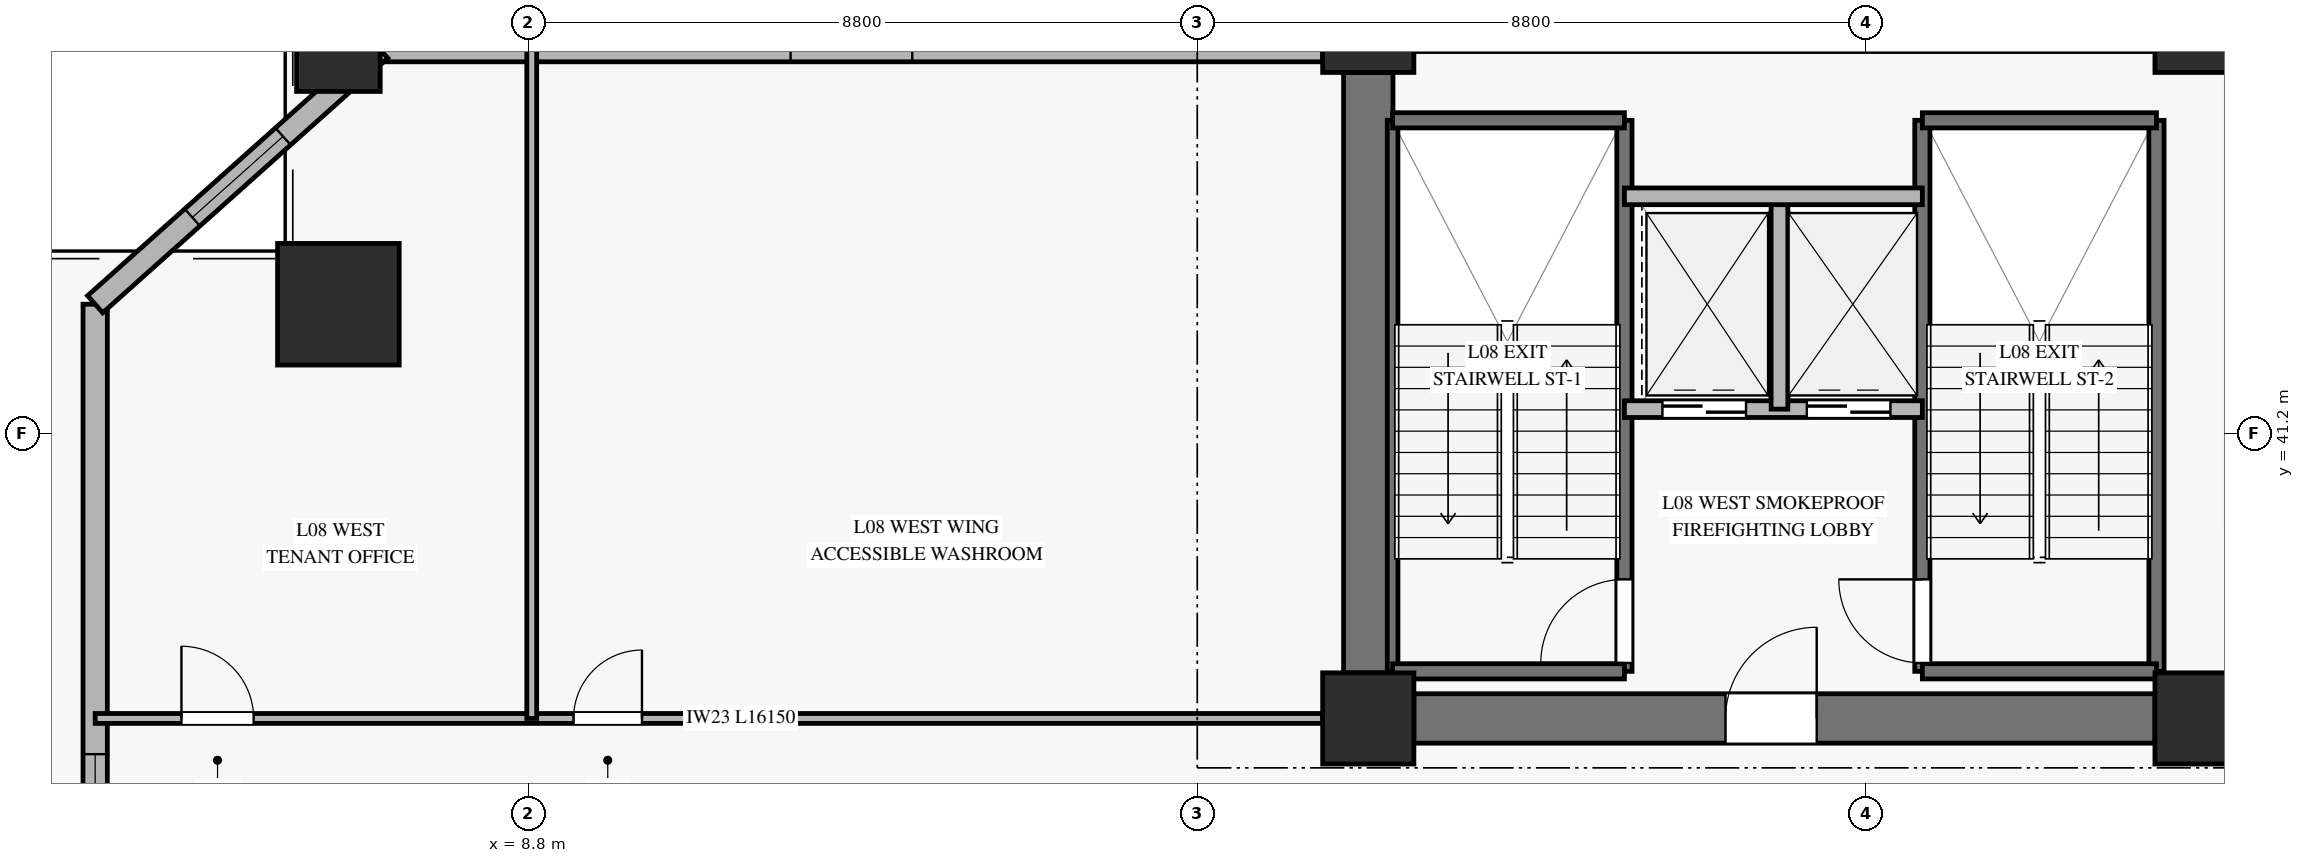
"""IFC4 building model, lengths in metres.
Left out: names, types, materials, properties, quantities, classifications, styles, units other than length and angle.
Written with IfcOpenShell. Run it as: python <this file> out.ifc"""

import sys

from ifc_helpers import new_model, si_unit, direction, frame, frame_2d, origin, origin_2d, place, context, subcontext, project, spatial, rectangle, hollow_rectangle, extrude, source, transform, mapped, element, fill, save


model = new_model("IFC4")
c1 = context("Model", 3, precision=1e-05, world=origin(), true_north=direction((0.0, 1.0)))
c2 = subcontext(c1, "Body", "Model", "MODEL_VIEW")
j1 = project(units=[si_unit("LENGTHUNIT", "METRE"), si_unit("PLANEANGLEUNIT", "RADIAN")], contexts=[c1])
p1 = place(None, origin())
s1 = spatial("IfcSite", under=j1, at=p1, CompositionType="ELEMENT")
p2 = place(p1, origin())
s2 = spatial("IfcBuilding", under=s1, at=p2, CompositionType="ELEMENT")
p3 = place(p2, frame((0.0, 0.0, 33.2)))
s3 = spatial("IfcBuildingStorey", under=s2, at=p3, CompositionType="ELEMENT", Elevation=33.2)
m1 = source(origin(), c2, "Body", "SweptSolid", [
    extrude(rectangle(XDim=1.2, YDim=1.2, at=origin_2d()), origin(), (0.0, 0.0, 1.0), 3.68),
])
for number, where, z_axis, x_axis in (
    (1, (19.85, 37.45, 0.0), (0.0, 0.0, 1.0), (1.0, 0.0, 0.0)),
    (2, (19.85, 46.55, 0.0), (0.0, 0.0, 1.0), (1.0, 0.0, 0.0)),
    (3, (30.8, 37.45, 0.0), (0.0, 0.0, 1.0), (1.0, 0.0, 0.0)),
    (4, (30.8, 46.55, 0.0), (0.0, 0.0, 1.0), (1.0, 0.0, 0.0)),
):
    element("IfcColumn", number, at=place(p3, frame(where, z_axis=z_axis, x_axis=x_axis)), inside=s3, PredefinedType="PILASTER", context=c2, shape_type="MappedRepresentation", body=[
        mapped(m1, transform((0.0, 0.0, 0.0), x_axis=(1.0, 0.0, 0.0), y_axis=(0.0, 1.0, 0.0), z_axis=(0.0, 0.0, 1.0), scale=1.0)),
    ])
p4 = place(p3, frame((20.45, 37.45, 0.0), z_axis=(0.0, 0.0, 1.0), x_axis=(1.0, 0.0, 0.0)))
e5 = element("IfcWall", 5, at=p4, inside=s3, PredefinedType="SHEAR", context=c2, shape_type="SweptSolid", body=[
    extrude(rectangle(XDim=9.75, YDim=0.65, at=frame_2d((4.875, 0.0))), origin(), (0.0, 0.0, 1.0), 3.68),
])
p5 = place(p4, frame((4.1, 0.0, 0.0)))
e6 = element("IfcOpeningElement", 6, at=p5, cuts=e5, PredefinedType="OPENING", context=c2, shape_type="SweptSolid", body=[
    extrude(rectangle(XDim=1.2, YDim=2.15, at=frame_2d((0.6, 1.075))), frame((0.0, 0.335, 0.0), z_axis=(0.0, -1.0, 0.0), x_axis=(1.0, 0.0, 0.0)), (0.0, 0.0, 1.0), 0.67),
])
p6 = place(p3, frame((19.85, 38.05, 0.0), z_axis=(0.0, 0.0, 1.0), x_axis=(0.0, 1.0, 0.0)))
e7 = element("IfcWall", 7, at=p6, inside=s3, PredefinedType="SHEAR", context=c2, shape_type="SweptSolid", body=[
    extrude(rectangle(XDim=7.9, YDim=0.65, at=frame_2d((3.95, 0.0))), origin(), (0.0, 0.0, 1.0), 3.68),
])
m2 = source(origin(), c2, "Body", "SweptSolid", [
    extrude(hollow_rectangle(XDim=1.6, YDim=1.6, WallThickness=0.075, at=origin_2d()), origin(), (0.0, 0.0, 1.0), 3.686),
])
p7 = place(p3, frame((6.3, 42.9, 0.0), z_axis=(0.056697506007, 0.007087188251, 0.998366247714), x_axis=(-0.124034734589, 0.992277876714, 0.0)))
e8 = element("IfcColumn", 8, at=p7, inside=s3, PredefinedType="COLUMN", context=c2, shape_type="MappedRepresentation", body=[
    mapped(m2, transform((0.0, 0.0, 0.0), x_axis=(1.0, 0.0, 0.0), y_axis=(0.0, 1.0, 0.0), z_axis=(0.0, 0.0, 1.0), scale=1.0)),
])
m3 = source(origin(), c2, "Body", "SweptSolid", [
    extrude(hollow_rectangle(XDim=1.1, YDim=1.1, WallThickness=0.05, at=origin_2d()), origin(), (0.0, 0.0, 1.0), 3.686),
])
p8 = place(p3, frame((6.3, 46.25, 0.0), z_axis=(0.056698929969, 0.0, 0.998391321747), x_axis=(0.0, 1.0, 0.0)))
e9 = element("IfcColumn", 9, at=p8, inside=s3, PredefinedType="COLUMN", context=c2, shape_type="MappedRepresentation", body=[
    mapped(m3, transform((0.0, 0.0, 0.0), x_axis=(1.0, 0.0, 0.0), y_axis=(0.0, 1.0, 0.0), z_axis=(0.0, 0.0, 1.0), scale=1.0)),
])
p9 = place(p3, frame((3.1, 25.25, 0.0), z_axis=(0.0, 0.0, 1.0), x_axis=(0.0, 1.0, 0.0)))
e10 = element("IfcWall", 10, at=p9, inside=s3, PredefinedType="SOLIDWALL", context=c2, shape_type="SweptSolid", body=[
    extrude(rectangle(XDim=17.65, YDim=0.32, at=frame_2d((8.825, 0.0))), origin(), (0.0, 0.0, 1.0), 3.16),
])
p10 = place(p9, frame((10.13, 0.0, 0.45)))
e11 = element("IfcOpeningElement", 11, at=p10, cuts=e10, PredefinedType="OPENING", context=c2, shape_type="SweptSolid", body=[
    extrude(rectangle(XDim=1.6, YDim=2.0, at=frame_2d((0.8, 1.0))), frame((0.0, 0.17, 0.0), z_axis=(0.0, -1.0, 0.0), x_axis=(1.0, 0.0, 0.0)), (0.0, 0.0, 1.0), 0.34),
])
p11 = place(p3, frame((6.85, 46.25, 0.0), z_axis=(0.0, 0.0, 1.0), x_axis=(1.0, 0.0, 0.0)))
e12 = element("IfcWall", 12, at=p11, inside=s3, PredefinedType="SOLIDWALL", context=c2, shape_type="SweptSolid", body=[
    extrude(rectangle(XDim=12.4, YDim=0.32, at=frame_2d((6.2, 0.0))), origin(), (0.0, 0.0, 1.0), 3.16),
])
p12 = place(p11, frame((5.4, 0.0, 0.45)))
e13 = element("IfcOpeningElement", 13, at=p12, cuts=e12, PredefinedType="OPENING", context=c2, shape_type="SweptSolid", body=[
    extrude(rectangle(XDim=1.6, YDim=2.0, at=frame_2d((0.8, 1.0))), frame((0.0, 0.17, 0.0), z_axis=(0.0, -1.0, 0.0), x_axis=(1.0, 0.0, 0.0)), (0.0, 0.0, 1.0), 0.34),
])
p13 = place(p3, frame((6.85, 46.25, 0.0), z_axis=(0.0, 0.0, 1.0), x_axis=(-0.745751558502, -0.666224146209, 0.0)))
e14 = element("IfcWall", 14, at=p13, inside=s3, PredefinedType="SOLIDWALL", context=c2, shape_type="SweptSolid", body=[
    extrude(rectangle(XDim=5.029, YDim=0.3, at=frame_2d((2.514, 0.0))), origin(), (0.0, 0.0, 1.0), 3.16),
])
p14 = place(p13, frame((1.714, 0.0, 0.45)))
e15 = element("IfcOpeningElement", 15, at=p14, cuts=e14, PredefinedType="OPENING", context=c2, shape_type="SweptSolid", body=[
    extrude(rectangle(XDim=1.6, YDim=2.0, at=frame_2d((0.8, 1.0))), frame((0.0, 0.16, 0.0), z_axis=(0.0, -1.0, 0.0), x_axis=(1.0, 0.0, 0.0)), (0.0, 0.0, 1.0), 0.32),
])
p15 = place(p3, frame((20.17, 38.07, 0.0), z_axis=(0.0, 0.0, 1.0), x_axis=(0.0, 1.0, 0.0)))
e16 = element("IfcWall", 16, at=p15, inside=s3, PredefinedType="SOLIDWALL", context=c2, shape_type="SweptSolid", body=[
    extrude(rectangle(XDim=7.25, YDim=0.14, at=frame_2d((3.625, 0.0))), origin(), (0.0, 0.0, 1.0), 3.9),
])
p16 = place(p3, frame((23.22, 38.07, 0.0), z_axis=(0.0, 0.0, 1.0), x_axis=(0.0, 1.0, 0.0)))
e17 = element("IfcWall", 17, at=p16, inside=s3, PredefinedType="SOLIDWALL", context=c2, shape_type="SweptSolid", body=[
    extrude(rectangle(XDim=7.25, YDim=0.2, at=frame_2d((3.625, 0.0))), origin(), (0.0, 0.0, 1.0), 3.9),
])
p17 = place(p16, frame((0.11, 0.0, 0.0)))
e18 = element("IfcOpeningElement", 18, at=p17, cuts=e17, PredefinedType="OPENING", context=c2, shape_type="SweptSolid", body=[
    extrude(rectangle(XDim=1.1, YDim=2.15, at=frame_2d((0.55, 1.075))), frame((0.0, 0.11, 0.0), z_axis=(0.0, -1.0, 0.0), x_axis=(1.0, 0.0, 0.0)), (0.0, 0.0, 1.0), 0.22),
])
for number, where, z_axis, x_axis in (
    (19, (20.17, 45.32, 0.0), (0.0, 0.0, 1.0), (1.0, 0.0, 0.0)),
    (20, (20.17, 38.07, 0.0), (0.0, 0.0, 1.0), (1.0, 0.0, 0.0)),
):
    element("IfcWall", number, at=place(p3, frame(where, z_axis=z_axis, x_axis=x_axis)), inside=s3, PredefinedType="SOLIDWALL", context=c2, shape_type="SweptSolid", body=[
        extrude(rectangle(XDim=3.05, YDim=0.2, at=frame_2d((1.525, 0.0))), origin(), (0.0, 0.0, 1.0), 3.9),
    ])
p18 = place(p3, frame((27.14, 38.07, 0.0), z_axis=(0.0, 0.0, 1.0), x_axis=(0.0, 1.0, 0.0)))
e21 = element("IfcWall", 21, at=p18, inside=s3, PredefinedType="SOLIDWALL", context=c2, shape_type="SweptSolid", body=[
    extrude(rectangle(XDim=7.25, YDim=0.2, at=frame_2d((3.625, 0.0))), origin(), (0.0, 0.0, 1.0), 3.9),
])
p19 = place(p18, frame((0.11, 0.0, 0.0)))
e22 = element("IfcOpeningElement", 22, at=p19, cuts=e21, PredefinedType="OPENING", context=c2, shape_type="SweptSolid", body=[
    extrude(rectangle(XDim=1.1, YDim=2.15, at=frame_2d((0.55, 1.075))), frame((0.0, 0.11, 0.0), z_axis=(0.0, -1.0, 0.0), x_axis=(1.0, 0.0, 0.0)), (0.0, 0.0, 1.0), 0.22),
])
p20 = place(p3, frame((30.22, 38.07, 0.0), z_axis=(0.0, 0.0, 1.0), x_axis=(0.0, 1.0, 0.0)))
e23 = element("IfcWall", 23, at=p20, inside=s3, PredefinedType="SOLIDWALL", context=c2, shape_type="SweptSolid", body=[
    extrude(rectangle(XDim=7.25, YDim=0.2, at=frame_2d((3.625, 0.0))), origin(), (0.0, 0.0, 1.0), 3.9),
])
for number, where, z_axis, x_axis in (
    (24, (27.14, 45.32, 0.0), (0.0, 0.0, 1.0), (1.0, 0.0, 0.0)),
    (25, (27.14, 38.07, 0.0), (0.0, 0.0, 1.0), (1.0, 0.0, 0.0)),
):
    element("IfcWall", number, at=place(p3, frame(where, z_axis=z_axis, x_axis=x_axis)), inside=s3, PredefinedType="SOLIDWALL", context=c2, shape_type="SweptSolid", body=[
        extrude(rectangle(XDim=3.08, YDim=0.2, at=frame_2d((1.54, 0.0))), origin(), (0.0, 0.0, 1.0), 3.9),
    ])
p21 = place(p3, frame((23.22, 41.52, 0.0), z_axis=(0.0, 0.0, 1.0), x_axis=(1.0, 0.0, 0.0)))
e26 = element("IfcWall", 26, at=p21, inside=s3, PredefinedType="SOLIDWALL", context=c2, shape_type="SweptSolid", body=[
    extrude(rectangle(XDim=3.92, YDim=0.22, at=frame_2d((1.96, 0.0))), origin(), (0.0, 0.0, 1.0), 3.68),
])
p22 = place(p21, frame((0.5, 0.0, 0.0)))
e27 = element("IfcOpeningElement", 27, at=p22, cuts=e26, PredefinedType="OPENING", context=c2, shape_type="SweptSolid", body=[
    extrude(rectangle(XDim=1.1, YDim=2.2, at=frame_2d((0.55, 1.1))), frame((0.0, 0.12, 0.0), z_axis=(0.0, -1.0, 0.0), x_axis=(1.0, 0.0, 0.0)), (0.0, 0.0, 1.0), 0.24),
])
p23 = place(p21, frame((2.4, 0.0, 0.0)))
e28 = element("IfcOpeningElement", 28, at=p23, cuts=e26, PredefinedType="OPENING", context=c2, shape_type="SweptSolid", body=[
    extrude(rectangle(XDim=1.1, YDim=2.2, at=frame_2d((0.55, 1.1))), frame((0.0, 0.12, 0.0), z_axis=(0.0, -1.0, 0.0), x_axis=(1.0, 0.0, 0.0)), (0.0, 0.0, 1.0), 0.24),
])
p24 = place(p3, frame((25.26, 41.52, 0.0), z_axis=(0.0, 0.0, 1.0), x_axis=(0.0, 1.0, 0.0)))
e29 = element("IfcWall", 29, at=p24, inside=s3, PredefinedType="SOLIDWALL", context=c2, shape_type="SweptSolid", body=[
    extrude(rectangle(XDim=2.8, YDim=0.22, at=frame_2d((1.4, 0.0))), origin(), (0.0, 0.0, 1.0), 3.68),
])
p25 = place(p3, frame((23.22, 44.32, 0.0), z_axis=(0.0, 0.0, 1.0), x_axis=(1.0, 0.0, 0.0)))
e30 = element("IfcWall", 30, at=p25, inside=s3, PredefinedType="SOLIDWALL", context=c2, shape_type="SweptSolid", body=[
    extrude(rectangle(XDim=3.92, YDim=0.22, at=frame_2d((1.96, 0.0))), origin(), (0.0, 0.0, 1.0), 3.68),
])
p26 = place(p3, frame((3.1, 37.45, 0.0), z_axis=(0.0, 0.0, 1.0), x_axis=(1.0, 0.0, 0.0)))
e31 = element("IfcWall", 31, at=p26, inside=s3, PredefinedType="PARTITIONING", context=c2, shape_type="SweptSolid", body=[
    extrude(rectangle(XDim=16.15, YDim=0.13, at=frame_2d((8.075, 0.0))), origin(), (0.0, 0.0, 1.0), 3.165),
])
p27 = place(p26, frame((1.135, 0.0, 0.0)))
e32 = element("IfcOpeningElement", 32, at=p27, cuts=e31, PredefinedType="OPENING", context=c2, shape_type="SweptSolid", body=[
    extrude(rectangle(XDim=0.95, YDim=2.1, at=frame_2d((0.475, 1.05))), frame((0.0, 0.075, 0.0), z_axis=(0.0, -1.0, 0.0), x_axis=(1.0, 0.0, 0.0)), (0.0, 0.0, 1.0), 0.15),
])
p28 = place(p26, frame((6.294, 0.0, 0.0)))
e33 = element("IfcOpeningElement", 33, at=p28, cuts=e31, PredefinedType="OPENING", context=c2, shape_type="SweptSolid", body=[
    extrude(rectangle(XDim=0.9, YDim=2.1, at=frame_2d((0.45, 1.05))), frame((0.0, 0.075, 0.0), z_axis=(0.0, -1.0, 0.0), x_axis=(1.0, 0.0, 0.0)), (0.0, 0.0, 1.0), 0.15),
])
p29 = place(p3, frame((8.844, 37.45, 0.0), z_axis=(0.0, 0.0, 1.0), x_axis=(0.0, 1.0, 0.0)))
e34 = element("IfcWall", 34, at=p29, inside=s3, PredefinedType="PARTITIONING", context=c2, shape_type="SweptSolid", body=[
    extrude(rectangle(XDim=8.8, YDim=0.13, at=frame_2d((4.4, 0.0))), origin(), (0.0, 0.0, 1.0), 3.68),
])
m4 = source(origin(), c2, "Body", "SweptSolid", [
    extrude(rectangle(XDim=1.6, YDim=2.0, at=frame_2d((0.8, 1.0))), frame((0.0, 0.03, 0.0), z_axis=(0.0, -1.0, 0.0), x_axis=(1.0, 0.0, 0.0)), (0.0, 0.0, 1.0), 0.06),
])
p30 = place(p10, origin())
e35 = element("IfcWindow", 35, at=p30, inside=s3, PartitioningType="SINGLE_PANEL", PredefinedType="WINDOW", context=c2, shape_type="MappedRepresentation", body=[
    mapped(m4, transform((0.0, 0.0, 0.0), x_axis=(1.0, 0.0, 0.0), y_axis=(0.0, 1.0, 0.0), z_axis=(0.0, 0.0, 1.0), scale=1.0)),
])
fill(e11, e35)
p31 = place(p14, origin())
e36 = element("IfcWindow", 36, at=p31, inside=s3, PartitioningType="SINGLE_PANEL", PredefinedType="WINDOW", context=c2, shape_type="MappedRepresentation", body=[
    mapped(m4, transform((0.0, 0.0, 0.0), x_axis=(1.0, 0.0, 0.0), y_axis=(0.0, 1.0, 0.0), z_axis=(0.0, 0.0, 1.0), scale=1.0)),
])
fill(e15, e36)
m5 = source(origin(), c2, "Body", "SweptSolid", [
    extrude(rectangle(XDim=1.1, YDim=2.15, at=frame_2d((0.55, 1.075))), frame((0.0, 0.025, 0.0), z_axis=(0.0, -1.0, 0.0), x_axis=(1.0, 0.0, 0.0)), (0.0, 0.0, 1.0), 0.05),
])
p32 = place(p17, origin())
e37 = element("IfcDoor", 37, at=p32, inside=s3, OperationType="SINGLE_SWING_LEFT", PredefinedType="DOOR", context=c2, shape_type="MappedRepresentation", body=[
    mapped(m5, transform((0.0, 0.0, 0.0), x_axis=(1.0, 0.0, 0.0), y_axis=(0.0, 1.0, 0.0), z_axis=(0.0, 0.0, 1.0), scale=1.0)),
])
fill(e18, e37)
p33 = place(p19, origin())
e38 = element("IfcDoor", 38, at=p33, inside=s3, OperationType="SINGLE_SWING_RIGHT", PredefinedType="DOOR", context=c2, shape_type="MappedRepresentation", body=[
    mapped(m5, transform((0.0, 0.0, 0.0), x_axis=(1.0, 0.0, 0.0), y_axis=(0.0, 1.0, 0.0), z_axis=(0.0, 0.0, 1.0), scale=1.0)),
])
fill(e22, e38)
m6 = source(origin(), c2, "Body", "SweptSolid", [
    extrude(rectangle(XDim=1.1, YDim=2.2, at=frame_2d((0.55, 1.1))), frame((0.0, 0.025, 0.0), z_axis=(0.0, -1.0, 0.0), x_axis=(1.0, 0.0, 0.0)), (0.0, 0.0, 1.0), 0.05),
])
p34 = place(p22, origin())
e39 = element("IfcDoor", 39, at=p34, inside=s3, OperationType="SLIDING_TO_LEFT", PredefinedType="DOOR", context=c2, shape_type="MappedRepresentation", body=[
    mapped(m6, transform((0.0, 0.0, 0.0), x_axis=(1.0, 0.0, 0.0), y_axis=(0.0, 1.0, 0.0), z_axis=(0.0, 0.0, 1.0), scale=1.0)),
])
fill(e27, e39)
p35 = place(p23, origin())
e40 = element("IfcDoor", 40, at=p35, inside=s3, OperationType="SLIDING_TO_LEFT", PredefinedType="DOOR", context=c2, shape_type="MappedRepresentation", body=[
    mapped(m6, transform((0.0, 0.0, 0.0), x_axis=(1.0, 0.0, 0.0), y_axis=(0.0, 1.0, 0.0), z_axis=(0.0, 0.0, 1.0), scale=1.0)),
])
fill(e28, e40)
m7 = source(origin(), c2, "Body", "SweptSolid", [
    extrude(rectangle(XDim=1.2, YDim=2.15, at=frame_2d((0.6, 1.075))), frame((0.0, 0.025, 0.0), z_axis=(0.0, -1.0, 0.0), x_axis=(1.0, 0.0, 0.0)), (0.0, 0.0, 1.0), 0.05),
])
p36 = place(p5, origin())
e41 = element("IfcDoor", 41, at=p36, inside=s3, OperationType="SINGLE_SWING_RIGHT", PredefinedType="DOOR", context=c2, shape_type="MappedRepresentation", body=[
    mapped(m7, transform((0.0, 0.0, 0.0), x_axis=(1.0, 0.0, 0.0), y_axis=(0.0, 1.0, 0.0), z_axis=(0.0, 0.0, 1.0), scale=1.0)),
])
fill(e6, e41)
m8 = source(origin(), c2, "Body", "SweptSolid", [
    extrude(rectangle(XDim=0.95, YDim=2.1, at=frame_2d((0.475, 1.05))), frame((0.0, 0.025, 0.0), z_axis=(0.0, -1.0, 0.0), x_axis=(1.0, 0.0, 0.0)), (0.0, 0.0, 1.0), 0.05),
])
p37 = place(p27, origin())
e42 = element("IfcDoor", 42, at=p37, inside=s3, OperationType="SINGLE_SWING_LEFT", PredefinedType="DOOR", context=c2, shape_type="MappedRepresentation", body=[
    mapped(m8, transform((0.0, 0.0, 0.0), x_axis=(1.0, 0.0, 0.0), y_axis=(0.0, 1.0, 0.0), z_axis=(0.0, 0.0, 1.0), scale=1.0)),
])
fill(e32, e42)
m9 = source(origin(), c2, "Body", "SweptSolid", [
    extrude(rectangle(XDim=0.9, YDim=2.1, at=frame_2d((0.45, 1.05))), frame((0.0, 0.025, 0.0), z_axis=(0.0, -1.0, 0.0), x_axis=(1.0, 0.0, 0.0)), (0.0, 0.0, 1.0), 0.05),
])
p38 = place(p28, origin())
e43 = element("IfcDoor", 43, at=p38, inside=s3, OperationType="SINGLE_SWING_RIGHT", PredefinedType="DOOR", context=c2, shape_type="MappedRepresentation", body=[
    mapped(m9, transform((0.0, 0.0, 0.0), x_axis=(1.0, 0.0, 0.0), y_axis=(0.0, 1.0, 0.0), z_axis=(0.0, 0.0, 1.0), scale=1.0)),
])
fill(e33, e43)
save(model, sys.argv[1])
